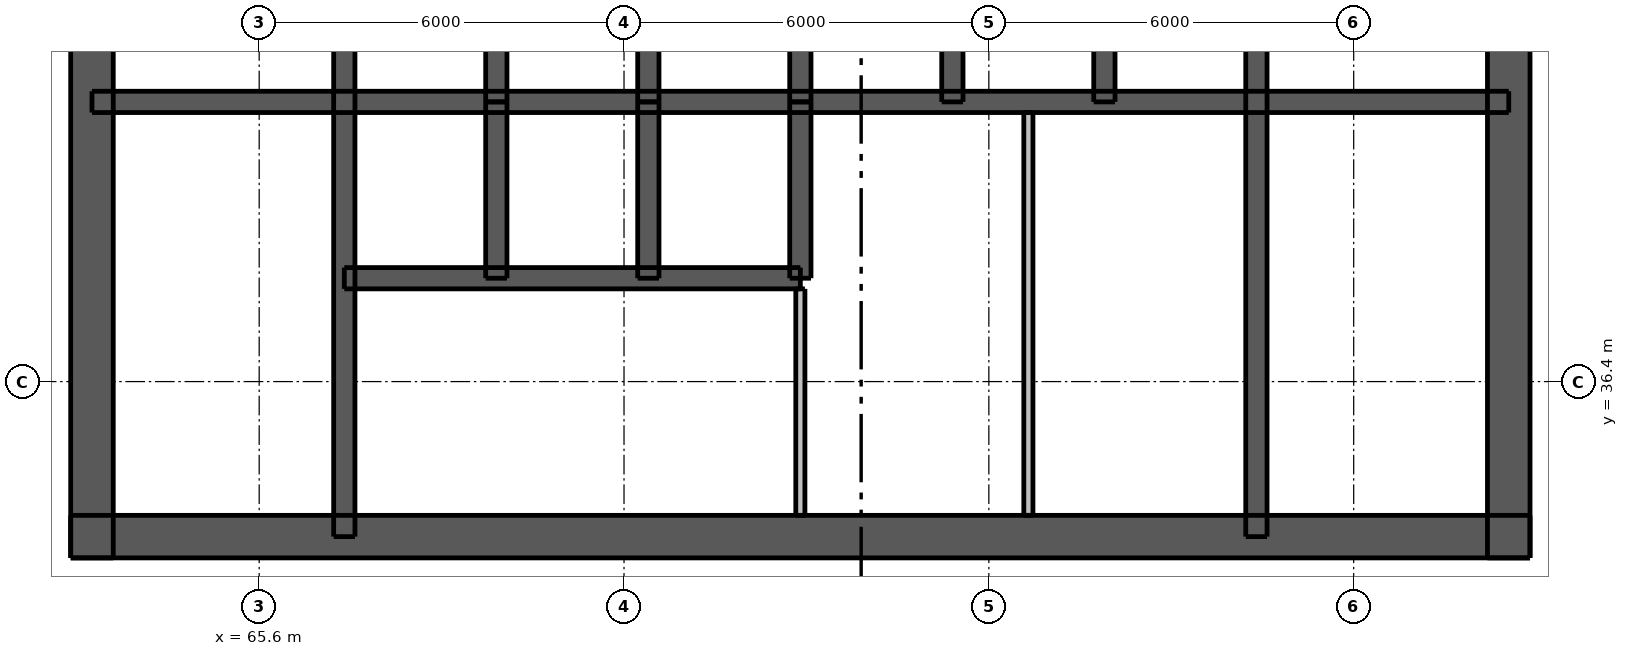
"""IFC4 building model, lengths in metres.
Left out: names, types, materials, properties, quantities, classifications, styles, units other than length and angle.
Written with IfcOpenShell. Run it as: python <this file> out.ifc"""

import sys

from ifc_helpers import new_model, si_unit, direction, frame, frame_2d, origin, place, context, subcontext, project, spatial, rectangle, extrude, element, fill, save


model = new_model("IFC4")
c1 = context("Model", 3, precision=1e-05, world=origin(), true_north=direction((0.0, 1.0)))
c2 = subcontext(c1, "Body", "Model", "MODEL_VIEW")
j1 = project(units=[si_unit("LENGTHUNIT", "METRE"), si_unit("PLANEANGLEUNIT", "RADIAN")], contexts=[c1])
p1 = place(None, origin())
s1 = spatial("IfcSite", under=j1, at=p1, CompositionType="ELEMENT")
p2 = place(p1, origin())
s2 = spatial("IfcBuilding", under=s1, at=p2, CompositionType="ELEMENT")
p3 = place(p2, frame((0.0, 0.0, 161.5)))
s3 = spatial("IfcBuildingStorey", under=s2, at=p3, CompositionType="ELEMENT", Elevation=161.5)
p4 = place(p3, frame((62.5, 33.85, 0.0), z_axis=(0.0, 0.0, 1.0), x_axis=(1.0, 0.0, 0.0)))
e1 = element("IfcWall", 1, at=p4, inside=s3, PredefinedType="SHEAR", context=c2, shape_type="SweptSolid", body=[
    extrude(rectangle(XDim=24.0, YDim=0.7, at=frame_2d((12.0, 0.0))), origin(), (0.0, 0.0, 1.0), 3.05),
])
p5 = place(p4, frame((1.962, 0.0, 0.0)))
e2 = element("IfcOpeningElement", 2, at=p5, cuts=e1, PredefinedType="OPENING", context=c2, shape_type="SweptSolid", body=[
    extrude(rectangle(XDim=1.1, YDim=2.1, at=frame_2d((0.55, 1.05))), frame((0.0, 0.36, 0.0), z_axis=(0.0, -1.0, 0.0), x_axis=(1.0, 0.0, 0.0)), (0.0, 0.0, 1.0), 0.72),
])
p6 = place(p4, frame((20.938, 0.0, 0.0)))
e3 = element("IfcOpeningElement", 3, at=p6, cuts=e1, PredefinedType="OPENING", context=c2, shape_type="SweptSolid", body=[
    extrude(rectangle(XDim=1.1, YDim=2.1, at=frame_2d((0.55, 1.05))), frame((0.0, 0.36, 0.0), z_axis=(0.0, -1.0, 0.0), x_axis=(1.0, 0.0, 0.0)), (0.0, 0.0, 1.0), 0.72),
])
p7 = place(p4, frame((8.0, 0.0, 0.0)))
e4 = element("IfcOpeningElement", 4, at=p7, cuts=e1, PredefinedType="OPENING", context=c2, shape_type="SweptSolid", body=[
    extrude(rectangle(XDim=1.1, YDim=2.1, at=frame_2d((0.55, 1.05))), frame((0.0, 0.36, 0.0), z_axis=(0.0, -1.0, 0.0), x_axis=(1.0, 0.0, 0.0)), (0.0, 0.0, 1.0), 0.72),
])
p8 = place(p4, frame((13.512, 0.0, 0.0)))
e5 = element("IfcOpeningElement", 5, at=p8, cuts=e1, PredefinedType="OPENING", context=c2, shape_type="SweptSolid", body=[
    extrude(rectangle(XDim=0.9, YDim=2.1, at=frame_2d((0.45, 1.05))), frame((0.0, 0.36, 0.0), z_axis=(0.0, -1.0, 0.0), x_axis=(1.0, 0.0, 0.0)), (0.0, 0.0, 1.0), 0.72),
])
p9 = place(p4, frame((17.087, 0.0, 0.0)))
e6 = element("IfcOpeningElement", 6, at=p9, cuts=e1, PredefinedType="OPENING", context=c2, shape_type="SweptSolid", body=[
    extrude(rectangle(XDim=0.9, YDim=2.1, at=frame_2d((0.45, 1.05))), frame((0.0, 0.36, 0.0), z_axis=(0.0, -1.0, 0.0), x_axis=(1.0, 0.0, 0.0)), (0.0, 0.0, 1.0), 0.72),
])
p10 = place(p3, frame((62.85, 33.5, 0.0), z_axis=(0.0, 0.0, 1.0), x_axis=(0.0, 1.0, 0.0)))
e7 = element("IfcWall", 7, at=p10, inside=s3, PredefinedType="SHEAR", context=c2, shape_type="SweptSolid", body=[
    extrude(rectangle(XDim=24.0, YDim=0.7, at=frame_2d((12.0, 0.0))), origin(), (0.0, 0.0, 1.0), 3.05),
])
p11 = place(p10, frame((11.2, 0.0, 0.0)))
e8 = element("IfcOpeningElement", 8, at=p11, cuts=e7, PredefinedType="OPENING", context=c2, shape_type="SweptSolid", body=[
    extrude(rectangle(XDim=1.6, YDim=2.1, at=frame_2d((0.8, 1.05))), frame((0.0, 0.36, 0.0), z_axis=(0.0, -1.0, 0.0), x_axis=(1.0, 0.0, 0.0)), (0.0, 0.0, 1.0), 0.72),
])
p12 = place(p3, frame((86.15, 33.5, 0.0), z_axis=(0.0, 0.0, 1.0), x_axis=(0.0, 1.0, 0.0)))
e9 = element("IfcWall", 9, at=p12, inside=s3, PredefinedType="SHEAR", context=c2, shape_type="SweptSolid", body=[
    extrude(rectangle(XDim=24.0, YDim=0.7, at=frame_2d((12.0, 0.0))), origin(), (0.0, 0.0, 1.0), 3.05),
])
p13 = place(p12, frame((11.2, 0.0, 0.0)))
e10 = element("IfcOpeningElement", 10, at=p13, cuts=e9, PredefinedType="OPENING", context=c2, shape_type="SweptSolid", body=[
    extrude(rectangle(XDim=1.6, YDim=2.1, at=frame_2d((0.8, 1.05))), frame((0.0, 0.36, 0.0), z_axis=(0.0, -1.0, 0.0), x_axis=(1.0, 0.0, 0.0)), (0.0, 0.0, 1.0), 0.72),
])
p14 = place(p3, frame((62.85, 41.0, 0.0), z_axis=(0.0, 0.0, 1.0), x_axis=(1.0, 0.0, 0.0)))
e11 = element("IfcWall", 11, at=p14, inside=s3, PredefinedType="SHEAR", context=c2, shape_type="SweptSolid", body=[
    extrude(rectangle(XDim=23.3, YDim=0.35, at=frame_2d((11.65, 0.0))), origin(), (0.0, 0.0, 1.0), 3.05),
])
p15 = place(p3, frame((67.0, 33.85, 0.0), z_axis=(0.0, 0.0, 1.0), x_axis=(0.0, 1.0, 0.0)))
e12 = element("IfcWall", 12, at=p15, inside=s3, PredefinedType="SHEAR", context=c2, shape_type="SweptSolid", body=[
    extrude(rectangle(XDim=10.05, YDim=0.35, at=frame_2d((5.025, 0.0))), origin(), (0.0, 0.0, 1.0), 3.05),
])
p16 = place(p15, frame((0.55, 0.0, 0.0)))
e13 = element("IfcOpeningElement", 13, at=p16, cuts=e12, PredefinedType="OPENING", context=c2, shape_type="SweptSolid", body=[
    extrude(rectangle(XDim=1.1, YDim=2.1, at=frame_2d((0.55, 1.05))), frame((0.0, 0.185, 0.0), z_axis=(0.0, -1.0, 0.0), x_axis=(1.0, 0.0, 0.0)), (0.0, 0.0, 1.0), 0.37),
])
p17 = place(p3, frame((82.0, 33.85, 0.0), z_axis=(0.0, 0.0, 1.0), x_axis=(0.0, 1.0, 0.0)))
e14 = element("IfcWall", 14, at=p17, inside=s3, PredefinedType="SHEAR", context=c2, shape_type="SweptSolid", body=[
    extrude(rectangle(XDim=10.05, YDim=0.35, at=frame_2d((5.025, 0.0))), origin(), (0.0, 0.0, 1.0), 3.05),
])
for number, where, z_axis, x_axis in (
    (15, (69.5, 41.0, 0.0), (0.0, 0.0, 1.0), (0.0, 1.0, 0.0)),
    (16, (72.0, 41.0, 0.0), (0.0, 0.0, 1.0), (0.0, 1.0, 0.0)),
    (17, (74.5, 41.0, 0.0), (0.0, 0.0, 1.0), (0.0, 1.0, 0.0)),
    (18, (77.0, 41.0, 0.0), (0.0, 0.0, 1.0), (0.0, 1.0, 0.0)),
    (19, (79.5, 41.0, 0.0), (0.0, 0.0, 1.0), (0.0, 1.0, 0.0)),
):
    element("IfcWall", number, at=place(p3, frame(where, z_axis=z_axis, x_axis=x_axis)), inside=s3, PredefinedType="SHEAR", context=c2, shape_type="SweptSolid", body=[
        extrude(rectangle(XDim=2.9, YDim=0.35, at=frame_2d((1.45, 0.0))), origin(), (0.0, 0.0, 1.0), 3.05),
    ])
p18 = place(p3, frame((67.0, 38.1, 0.0), z_axis=(0.0, 0.0, 1.0), x_axis=(1.0, 0.0, 0.0)))
e20 = element("IfcWall", 20, at=p18, inside=s3, PredefinedType="SHEAR", context=c2, shape_type="SweptSolid", body=[
    extrude(rectangle(XDim=7.5, YDim=0.35, at=frame_2d((3.75, 0.0))), origin(), (0.0, 0.0, 1.0), 3.05),
])
p19 = place(p18, frame((0.7, 0.0, 0.0)))
e21 = element("IfcOpeningElement", 21, at=p19, cuts=e20, PredefinedType="OPENING", context=c2, shape_type="SweptSolid", body=[
    extrude(rectangle(XDim=1.1, YDim=2.1, at=frame_2d((0.55, 1.05))), frame((0.0, 0.185, 0.0), z_axis=(0.0, -1.0, 0.0), x_axis=(1.0, 0.0, 0.0)), (0.0, 0.0, 1.0), 0.37),
])
p20 = place(p18, frame((3.2, 0.0, 0.0)))
e22 = element("IfcOpeningElement", 22, at=p20, cuts=e20, PredefinedType="OPENING", context=c2, shape_type="SweptSolid", body=[
    extrude(rectangle(XDim=1.1, YDim=2.1, at=frame_2d((0.55, 1.05))), frame((0.0, 0.185, 0.0), z_axis=(0.0, -1.0, 0.0), x_axis=(1.0, 0.0, 0.0)), (0.0, 0.0, 1.0), 0.37),
])
p21 = place(p18, frame((5.65, 0.0, 0.0)))
e23 = element("IfcOpeningElement", 23, at=p21, cuts=e20, PredefinedType="OPENING", context=c2, shape_type="SweptSolid", body=[
    extrude(rectangle(XDim=1.2, YDim=2.1, at=frame_2d((0.6, 1.05))), frame((0.0, 0.185, 0.0), z_axis=(0.0, -1.0, 0.0), x_axis=(1.0, 0.0, 0.0)), (0.0, 0.0, 1.0), 0.37),
])
for number, where, z_axis, x_axis in (
    (24, (69.5, 38.1, 0.0), (0.0, 0.0, 1.0), (0.0, 1.0, 0.0)),
    (25, (72.0, 38.1, 0.0), (0.0, 0.0, 1.0), (0.0, 1.0, 0.0)),
    (26, (74.5, 38.1, 0.0), (0.0, 0.0, 1.0), (0.0, 1.0, 0.0)),
):
    element("IfcWall", number, at=place(p3, frame(where, z_axis=z_axis, x_axis=x_axis)), inside=s3, PredefinedType="SHEAR", context=c2, shape_type="SweptSolid", body=[
        extrude(rectangle(XDim=2.9, YDim=0.35, at=frame_2d((1.45, 0.0))), origin(), (0.0, 0.0, 1.0), 3.05),
    ])
p22 = place(p3, frame((74.5, 34.2, 0.0), z_axis=(0.0, 0.0, 1.0), x_axis=(0.0, 1.0, 0.0)))
e27 = element("IfcWall", 27, at=p22, inside=s3, PredefinedType="PLUMBINGWALL", context=c2, shape_type="SweptSolid", body=[
    extrude(rectangle(XDim=3.725, YDim=0.15, at=frame_2d((1.863, 0.0))), origin(), (0.0, 0.0, 1.0), 3.05),
])
p23 = place(p3, frame((78.25, 34.2, 0.0), z_axis=(0.0, 0.0, 1.0), x_axis=(0.0, 1.0, 0.0)))
e28 = element("IfcWall", 28, at=p23, inside=s3, PredefinedType="PLUMBINGWALL", context=c2, shape_type="SweptSolid", body=[
    extrude(rectangle(XDim=6.625, YDim=0.15, at=frame_2d((3.312, 0.0))), origin(), (0.0, 0.0, 1.0), 3.05),
])
p24 = place(p5, origin())
e29 = element("IfcDoor", 29, at=p24, inside=s3, OperationType="SINGLE_SWING_LEFT", PredefinedType="DOOR", context=c2, shape_type="SweptSolid", body=[
    extrude(rectangle(XDim=1.1, YDim=2.1, at=frame_2d((0.55, 1.05))), frame((0.0, 0.337, 0.0), z_axis=(0.0, -1.0, 0.0), x_axis=(1.0, 0.0, 0.0)), (0.0, 0.0, 1.0), 0.05),
])
fill(e2, e29)
p25 = place(p6, origin())
e30 = element("IfcDoor", 30, at=p25, inside=s3, OperationType="SINGLE_SWING_RIGHT", PredefinedType="DOOR", context=c2, shape_type="SweptSolid", body=[
    extrude(rectangle(XDim=1.1, YDim=2.1, at=frame_2d((0.55, 1.05))), frame((0.0, 0.337, 0.0), z_axis=(0.0, -1.0, 0.0), x_axis=(1.0, 0.0, 0.0)), (0.0, 0.0, 1.0), 0.05),
])
fill(e3, e30)
p26 = place(p7, origin())
e31 = element("IfcDoor", 31, at=p26, inside=s3, OperationType="SINGLE_SWING_LEFT", PredefinedType="DOOR", context=c2, shape_type="SweptSolid", body=[
    extrude(rectangle(XDim=1.1, YDim=2.1, at=frame_2d((0.55, 1.05))), frame((0.0, 0.337, 0.0), z_axis=(0.0, -1.0, 0.0), x_axis=(1.0, 0.0, 0.0)), (0.0, 0.0, 1.0), 0.05),
])
fill(e4, e31)
p27 = place(p16, origin())
e32 = element("IfcDoor", 32, at=p27, inside=s3, OperationType="SINGLE_SWING_RIGHT", PredefinedType="DOOR", context=c2, shape_type="SweptSolid", body=[
    extrude(rectangle(XDim=1.1, YDim=2.1, at=frame_2d((0.55, 1.05))), frame((0.0, -0.112, 0.0), z_axis=(0.0, -1.0, 0.0), x_axis=(1.0, 0.0, 0.0)), (0.0, 0.0, 1.0), 0.05),
])
fill(e13, e32)
p28 = place(p8, origin())
e33 = element("IfcDoor", 33, at=p28, inside=s3, OperationType="SINGLE_SWING_LEFT", PredefinedType="DOOR", context=c2, shape_type="SweptSolid", body=[
    extrude(rectangle(XDim=0.9, YDim=2.1, at=frame_2d((0.45, 1.05))), frame((0.0, 0.337, 0.0), z_axis=(0.0, -1.0, 0.0), x_axis=(1.0, 0.0, 0.0)), (0.0, 0.0, 1.0), 0.05),
])
fill(e5, e33)
p29 = place(p9, origin())
e34 = element("IfcDoor", 34, at=p29, inside=s3, OperationType="SINGLE_SWING_LEFT", PredefinedType="DOOR", context=c2, shape_type="SweptSolid", body=[
    extrude(rectangle(XDim=0.9, YDim=2.1, at=frame_2d((0.45, 1.05))), frame((0.0, 0.337, 0.0), z_axis=(0.0, -1.0, 0.0), x_axis=(1.0, 0.0, 0.0)), (0.0, 0.0, 1.0), 0.05),
])
fill(e6, e34)
p30 = place(p19, origin())
e35 = element("IfcDoor", 35, at=p30, inside=s3, OperationType="DOUBLE_DOOR_SLIDING", PredefinedType="DOOR", context=c2, shape_type="SweptSolid", body=[
    extrude(rectangle(XDim=1.1, YDim=2.1, at=frame_2d((0.55, 1.05))), frame((0.0, 0.025, 0.0), z_axis=(0.0, -1.0, 0.0), x_axis=(1.0, 0.0, 0.0)), (0.0, 0.0, 1.0), 0.05),
])
fill(e21, e35)
p31 = place(p20, origin())
e36 = element("IfcDoor", 36, at=p31, inside=s3, OperationType="DOUBLE_DOOR_SLIDING", PredefinedType="DOOR", context=c2, shape_type="SweptSolid", body=[
    extrude(rectangle(XDim=1.1, YDim=2.1, at=frame_2d((0.55, 1.05))), frame((0.0, 0.025, 0.0), z_axis=(0.0, -1.0, 0.0), x_axis=(1.0, 0.0, 0.0)), (0.0, 0.0, 1.0), 0.05),
])
fill(e22, e36)
p32 = place(p21, origin())
e37 = element("IfcDoor", 37, at=p32, inside=s3, OperationType="DOUBLE_DOOR_SLIDING", PredefinedType="DOOR", context=c2, shape_type="SweptSolid", body=[
    extrude(rectangle(XDim=1.2, YDim=2.1, at=frame_2d((0.6, 1.05))), frame((0.0, 0.025, 0.0), z_axis=(0.0, -1.0, 0.0), x_axis=(1.0, 0.0, 0.0)), (0.0, 0.0, 1.0), 0.05),
])
fill(e23, e37)
save(model, sys.argv[1])
